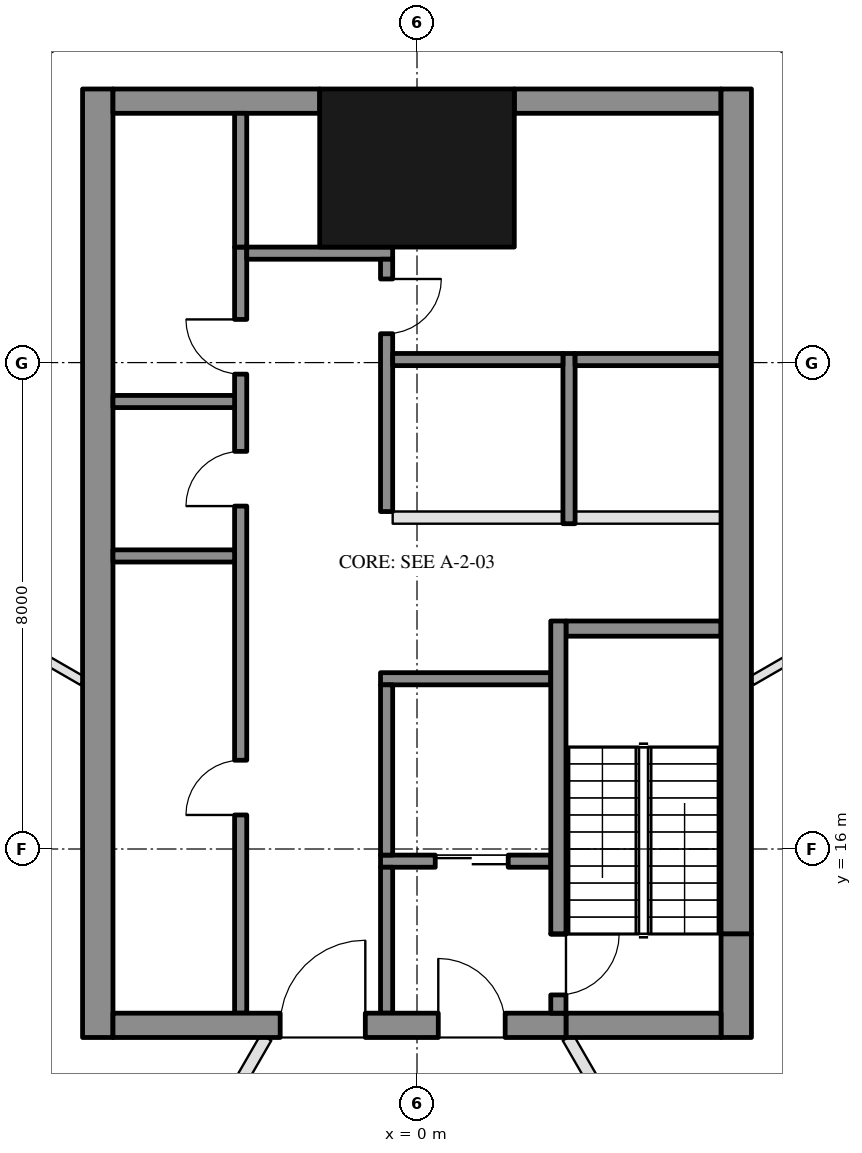
"""IFC4 building model, lengths in metres.
Left out: names, types, materials, properties, quantities, classifications, styles, units other than length and angle.
Written with IfcOpenShell. Run it as: python <this file> out.ifc"""

import sys

from ifc_helpers import new_model, si_unit, direction, frame, frame_2d, origin, origin_2d, place, context, subcontext, project, spatial, rectangle, hollow_rectangle, extrude, element, fill, save


model = new_model("IFC4")
c1 = context("Model", 3, precision=1e-05, world=origin(), true_north=direction((0.0, 1.0)))
c2 = subcontext(c1, "Body", "Model", "MODEL_VIEW")
j1 = project(units=[si_unit("LENGTHUNIT", "METRE"), si_unit("PLANEANGLEUNIT", "RADIAN")], contexts=[c1])
p1 = place(None, origin())
s1 = spatial("IfcSite", under=j1, at=p1, CompositionType="ELEMENT")
p2 = place(p1, origin())
s2 = spatial("IfcBuilding", under=s1, at=p2, CompositionType="ELEMENT")
p3 = place(p2, frame((0.0, 0.0, 15.5)))
s3 = spatial("IfcBuildingStorey", under=s2, at=p3, CompositionType="ELEMENT", Elevation=15.5)
p4 = place(p3, frame((0.0, 27.2, 0.0), z_axis=(0.0, 0.0, 1.0), x_axis=(1.0, 0.0, 0.0)))
e1 = element("IfcColumn", 1, at=p4, inside=s3, PredefinedType="COLUMN", context=c2, shape_type="SweptSolid", body=[
    extrude(hollow_rectangle(XDim=3.2, YDim=2.6, WallThickness=0.08, at=origin_2d()), origin(), (0.0, 0.0, 1.0), 8.0),
])
for number, where, z_axis, x_axis in (
    (2, (6.634, 28.969, 0.0), (0.0, 0.0, 1.0), (-0.866, 0.5, 0.0)),
    (3, (-4.887, 29.977, 0.0), (0.0, 0.0, 1.0), (-0.866, -0.5, 0.0)),
):
    element("IfcWall", number, at=place(p3, frame(where, z_axis=z_axis, x_axis=x_axis)), inside=s3, PredefinedType="SOLIDWALL", context=c2, shape_type="SweptSolid", body=[
        extrude(rectangle(XDim=2.017, YDim=0.35, at=frame_2d((1.009, 0.0))), origin(), (0.0, 0.0, 1.0), 7.7),
    ])
p5 = place(p3, frame((-5.25, 12.9, 0.0), z_axis=(0.0, 0.0, 1.0), x_axis=(0.0, 1.0, 0.0)))
e4 = element("IfcWall", 4, at=p5, inside=s3, PredefinedType="SHEAR", context=c2, shape_type="SweptSolid", body=[
    extrude(rectangle(XDim=15.6, YDim=0.5, at=frame_2d((7.8, 0.0))), origin(), (0.0, 0.0, 1.0), 7.7),
])
for number, where, z_axis, x_axis in (
    (5, (-1.6, 28.3, 0.0), (0.0, 0.0, 1.0), (-1.0, 0.0, 0.0)),
    (6, (5.0, 28.3, 0.0), (0.0, 0.0, 1.0), (-1.0, 0.0, 0.0)),
):
    element("IfcWall", number, at=place(p3, frame(where, z_axis=z_axis, x_axis=x_axis)), inside=s3, PredefinedType="SHEAR", context=c2, shape_type="SweptSolid", body=[
        extrude(rectangle(XDim=3.4, YDim=0.4, at=frame_2d((1.7, 0.0))), origin(), (0.0, 0.0, 1.0), 7.7),
    ])
p6 = place(p3, frame((5.0, 19.625, 0.0), z_axis=(0.0, 0.0, 1.0), x_axis=(-1.0, 0.0, 0.0)))
e7 = element("IfcWall", 7, at=p6, inside=s3, PredefinedType="SHEAR", context=c2, shape_type="SweptSolid", body=[
    extrude(rectangle(XDim=2.55, YDim=0.25, at=frame_2d((1.275, 0.0))), origin(), (0.0, 0.0, 1.0), 7.7),
])
p7 = place(p3, frame((2.2, 18.8, 0.0), z_axis=(0.0, 0.0, 1.0), x_axis=(-1.0, 0.0, 0.0)))
e8 = element("IfcWall", 8, at=p7, inside=s3, PredefinedType="SHEAR", context=c2, shape_type="SweptSolid", body=[
    extrude(rectangle(XDim=2.8, YDim=0.2, at=frame_2d((1.4, 0.0))), origin(), (0.0, 0.0, 1.0), 7.7),
])
p8 = place(p3, frame((2.2, 15.8, 0.0), z_axis=(0.0, 0.0, 1.0), x_axis=(-1.0, 0.0, 0.0)))
e9 = element("IfcWall", 9, at=p8, inside=s3, PredefinedType="SHEAR", context=c2, shape_type="SweptSolid", body=[
    extrude(rectangle(XDim=2.8, YDim=0.2, at=frame_2d((1.4, 0.0))), origin(), (0.0, 0.0, 1.0), 7.7),
])
p9 = place(p8, frame((0.7, 0.0, 0.0)))
e10 = element("IfcOpeningElement", 10, at=p9, cuts=e9, PredefinedType="OPENING", context=c2, shape_type="SweptSolid", body=[
    extrude(rectangle(XDim=1.2, YDim=2.1, at=frame_2d((0.6, 1.05))), frame((0.0, 0.11, 0.0), z_axis=(0.0, -1.0, 0.0), x_axis=(1.0, 0.0, 0.0)), (0.0, 0.0, 1.0), 0.22),
])
p10 = place(p3, frame((-0.5, 15.9, 0.0), z_axis=(0.0, 0.0, 1.0), x_axis=(0.0, 1.0, 0.0)))
e11 = element("IfcWall", 11, at=p10, inside=s3, PredefinedType="SHEAR", context=c2, shape_type="SweptSolid", body=[
    extrude(rectangle(XDim=2.8, YDim=0.2, at=frame_2d((1.4, 0.0))), origin(), (0.0, 0.0, 1.0), 7.7),
])
p11 = place(p3, frame((-0.5, 13.3, 0.0), z_axis=(0.0, 0.0, 1.0), x_axis=(0.0, 1.0, 0.0)))
e12 = element("IfcWall", 12, at=p11, inside=s3, PredefinedType="SHEAR", context=c2, shape_type="SweptSolid", body=[
    extrude(rectangle(XDim=2.4, YDim=0.2, at=frame_2d((1.2, 0.0))), origin(), (0.0, 0.0, 1.0), 7.7),
])
p12 = place(p3, frame((-2.9, 13.3, 0.0), z_axis=(0.0, 0.0, 1.0), x_axis=(0.0, 1.0, 0.0)))
e13 = element("IfcWall", 13, at=p12, inside=s3, PredefinedType="SHEAR", context=c2, shape_type="SweptSolid", body=[
    extrude(rectangle(XDim=12.6, YDim=0.2, at=frame_2d((6.3, 0.0))), origin(), (0.0, 0.0, 1.0), 7.7),
])
p13 = place(p12, frame((3.26, 0.0, 0.0)))
e14 = element("IfcOpeningElement", 14, at=p13, cuts=e13, PredefinedType="OPENING", context=c2, shape_type="SweptSolid", body=[
    extrude(rectangle(XDim=0.9, YDim=2.1, at=frame_2d((0.45, 1.05))), frame((0.0, 0.11, 0.0), z_axis=(0.0, -1.0, 0.0), x_axis=(1.0, 0.0, 0.0)), (0.0, 0.0, 1.0), 0.22),
])
p14 = place(p12, frame((8.34, 0.0, 0.0)))
e15 = element("IfcOpeningElement", 15, at=p14, cuts=e13, PredefinedType="OPENING", context=c2, shape_type="SweptSolid", body=[
    extrude(rectangle(XDim=0.9, YDim=2.1, at=frame_2d((0.45, 1.05))), frame((0.0, 0.11, 0.0), z_axis=(0.0, -1.0, 0.0), x_axis=(1.0, 0.0, 0.0)), (0.0, 0.0, 1.0), 0.22),
])
p15 = place(p12, frame((10.51, 0.0, 0.0)))
e16 = element("IfcOpeningElement", 16, at=p15, cuts=e13, PredefinedType="OPENING", context=c2, shape_type="SweptSolid", body=[
    extrude(rectangle(XDim=0.9, YDim=2.1, at=frame_2d((0.45, 1.05))), frame((0.0, 0.11, 0.0), z_axis=(0.0, -1.0, 0.0), x_axis=(1.0, 0.0, 0.0)), (0.0, 0.0, 1.0), 0.22),
])
p16 = place(p3, frame((-0.4, 25.8, 0.0), z_axis=(0.0, 0.0, 1.0), x_axis=(-1.0, 0.0, 0.0)))
e17 = element("IfcWall", 17, at=p16, inside=s3, PredefinedType="SHEAR", context=c2, shape_type="SweptSolid", body=[
    extrude(rectangle(XDim=2.4, YDim=0.2, at=frame_2d((1.2, 0.0))), origin(), (0.0, 0.0, 1.0), 7.7),
])
p17 = place(p3, frame((-0.5, 21.55, 0.0), z_axis=(0.0, 0.0, 1.0), x_axis=(0.0, 1.0, 0.0)))
e18 = element("IfcWall", 18, at=p17, inside=s3, PredefinedType="SHEAR", context=c2, shape_type="SweptSolid", body=[
    extrude(rectangle(XDim=4.15, YDim=0.2, at=frame_2d((2.075, 0.0))), origin(), (0.0, 0.0, 1.0), 7.7),
])
p18 = place(p17, frame((2.925, 0.0, 0.0)))
e19 = element("IfcOpeningElement", 19, at=p18, cuts=e18, PredefinedType="OPENING", context=c2, shape_type="SweptSolid", body=[
    extrude(rectangle(XDim=0.9, YDim=2.1, at=frame_2d((0.45, 1.05))), frame((0.0, 0.11, 0.0), z_axis=(0.0, -1.0, 0.0), x_axis=(1.0, 0.0, 0.0)), (0.0, 0.0, 1.0), 0.22),
])
for number, where, z_axis, x_axis in (
    (20, (-3.0, 20.82, 0.0), (0.0, 0.0, 1.0), (-1.0, 0.0, 0.0)),
    (21, (-3.0, 23.36, 0.0), (0.0, 0.0, 1.0), (-1.0, 0.0, 0.0)),
):
    element("IfcWall", number, at=place(p3, frame(where, z_axis=z_axis, x_axis=x_axis)), inside=s3, PredefinedType="SHEAR", context=c2, shape_type="SweptSolid", body=[
        extrude(rectangle(XDim=2.0, YDim=0.2, at=frame_2d((1.0, 0.0))), origin(), (0.0, 0.0, 1.0), 7.7),
    ])
p19 = place(p3, frame((-2.9, 25.9, 0.0), z_axis=(0.0, 0.0, 1.0), x_axis=(0.0, 1.0, 0.0)))
e22 = element("IfcWall", 22, at=p19, inside=s3, PredefinedType="SHEAR", context=c2, shape_type="SweptSolid", body=[
    extrude(rectangle(XDim=2.2, YDim=0.2, at=frame_2d((1.1, 0.0))), origin(), (0.0, 0.0, 1.0), 7.7),
])
p20 = place(p3, frame((2.5, 21.35, 0.0), z_axis=(0.0, 0.0, 1.0), x_axis=(0.0, 1.0, 0.0)))
e23 = element("IfcWall", 23, at=p20, inside=s3, PredefinedType="SHEAR", context=c2, shape_type="SweptSolid", body=[
    extrude(rectangle(XDim=2.8, YDim=0.2, at=frame_2d((1.4, 0.0))), origin(), (0.0, 0.0, 1.0), 7.7),
])
p21 = place(p3, frame((5.0, 24.05, 0.0), z_axis=(0.0, 0.0, 1.0), x_axis=(-1.0, 0.0, 0.0)))
e24 = element("IfcWall", 24, at=p21, inside=s3, PredefinedType="SHEAR", context=c2, shape_type="SweptSolid", body=[
    extrude(rectangle(XDim=2.4, YDim=0.2, at=frame_2d((1.2, 0.0))), origin(), (0.0, 0.0, 1.0), 7.7),
])
p22 = place(p3, frame((2.4, 24.05, 0.0), z_axis=(0.0, 0.0, 1.0), x_axis=(-1.0, 0.0, 0.0)))
e25 = element("IfcWall", 25, at=p22, inside=s3, PredefinedType="SHEAR", context=c2, shape_type="SweptSolid", body=[
    extrude(rectangle(XDim=2.8, YDim=0.2, at=frame_2d((1.4, 0.0))), origin(), (0.0, 0.0, 1.0), 7.7),
])
p23 = place(p3, frame((5.0, 21.45, 0.0), z_axis=(0.0, 0.0, 1.0), x_axis=(-1.0, 0.0, 0.0)))
e26 = element("IfcWall", 26, at=p23, inside=s3, PredefinedType="PARTITIONING", context=c2, shape_type="SweptSolid", body=[
    extrude(rectangle(XDim=2.4, YDim=0.2, at=frame_2d((1.2, 0.0))), origin(), (0.0, 0.0, 1.0), 7.7),
])
p24 = place(p3, frame((2.4, 21.45, 0.0), z_axis=(0.0, 0.0, 1.0), x_axis=(-1.0, 0.0, 0.0)))
e27 = element("IfcWall", 27, at=p24, inside=s3, PredefinedType="PARTITIONING", context=c2, shape_type="SweptSolid", body=[
    extrude(rectangle(XDim=2.8, YDim=0.2, at=frame_2d((1.4, 0.0))), origin(), (0.0, 0.0, 1.0), 7.7),
])
p25 = place(p3, frame((5.25, 12.9, 0.0), z_axis=(0.0, 0.0, 1.0), x_axis=(0.0, 1.0, 0.0)))
e28 = element("IfcWall", 28, at=p25, inside=s3, PredefinedType="SHEAR", context=c2, shape_type="SweptSolid", body=[
    extrude(rectangle(XDim=1.706, YDim=0.5, at=frame_2d((0.853, 0.0))), origin(), (0.0, 0.0, 1.0), 7.7),
])
p26 = place(p3, frame((5.25, 14.606, 0.0), z_axis=(0.0, 0.0, 1.0), x_axis=(0.0, 1.0, 0.0)))
e29 = element("IfcWall", 29, at=p26, inside=s3, PredefinedType="SHEAR", context=c2, shape_type="SweptSolid", body=[
    extrude(rectangle(XDim=13.894, YDim=0.5, at=frame_2d((6.947, 0.0))), origin(), (0.0, 0.0, 1.0), 7.7),
])
p27 = place(p3, frame((5.0, 13.1, 0.0), z_axis=(0.0, 0.0, 1.0), x_axis=(-1.0, 0.0, 0.0)))
e30 = element("IfcWall", 30, at=p27, inside=s3, PredefinedType="SHEAR", context=c2, shape_type="SweptSolid", body=[
    extrude(rectangle(XDim=2.55, YDim=0.4, at=frame_2d((1.275, 0.0))), origin(), (0.0, 0.0, 1.0), 7.7),
])
p28 = place(p3, frame((2.45, 13.1, 0.0), z_axis=(0.0, 0.0, 1.0), x_axis=(-1.0, 0.0, 0.0)))
e31 = element("IfcWall", 31, at=p28, inside=s3, PredefinedType="SHEAR", context=c2, shape_type="SweptSolid", body=[
    extrude(rectangle(XDim=7.45, YDim=0.4, at=frame_2d((3.725, 0.0))), origin(), (0.0, 0.0, 1.0), 7.7),
])
p29 = place(p28, frame((1.0, 0.0, 0.0)))
e32 = element("IfcOpeningElement", 32, at=p29, cuts=e31, PredefinedType="OPENING", context=c2, shape_type="SweptSolid", body=[
    extrude(rectangle(XDim=1.1, YDim=2.1, at=frame_2d((0.55, 1.05))), frame((0.0, 0.21, 0.0), z_axis=(0.0, -1.0, 0.0), x_axis=(1.0, 0.0, 0.0)), (0.0, 0.0, 1.0), 0.42),
])
p30 = place(p28, frame((3.3, 0.0, 0.0)))
e33 = element("IfcOpeningElement", 33, at=p30, cuts=e31, PredefinedType="OPENING", context=c2, shape_type="SweptSolid", body=[
    extrude(rectangle(XDim=1.4, YDim=2.1, at=frame_2d((0.7, 1.05))), frame((0.0, 0.21, 0.0), z_axis=(0.0, -1.0, 0.0), x_axis=(1.0, 0.0, 0.0)), (0.0, 0.0, 1.0), 0.42),
])
p31 = place(p3, frame((2.325, 13.3, 0.0), z_axis=(0.0, 0.0, 1.0), x_axis=(0.0, 1.0, 0.0)))
e34 = element("IfcWall", 34, at=p31, inside=s3, PredefinedType="SHEAR", context=c2, shape_type="SweptSolid", body=[
    extrude(rectangle(XDim=1.306, YDim=0.25, at=frame_2d((0.653, 0.0))), origin(), (0.0, 0.0, 1.0), 7.7),
])
p32 = place(p31, frame((0.3, 0.0, 0.0)))
e35 = element("IfcOpeningElement", 35, at=p32, cuts=e34, PredefinedType="OPENING", context=c2, shape_type="SweptSolid", body=[
    extrude(rectangle(XDim=1.0, YDim=2.1, at=frame_2d((0.5, 1.05))), frame((0.0, 0.135, 0.0), z_axis=(0.0, -1.0, 0.0), x_axis=(1.0, 0.0, 0.0)), (0.0, 0.0, 1.0), 0.27),
])
p33 = place(p3, frame((2.325, 14.606, 0.0), z_axis=(0.0, 0.0, 1.0), x_axis=(0.0, 1.0, 0.0)))
e36 = element("IfcWall", 36, at=p33, inside=s3, PredefinedType="SHEAR", context=c2, shape_type="SweptSolid", body=[
    extrude(rectangle(XDim=5.144, YDim=0.25, at=frame_2d((2.572, 0.0))), origin(), (0.0, 0.0, 1.0), 7.7),
])
p34 = place(p3, frame((14.581, 15.808, 0.0), z_axis=(0.0, 0.0, 1.0), x_axis=(-0.866032672044, -0.499987410794, 0.0)))
e37 = element("IfcWall", 37, at=p34, inside=s3, PredefinedType="SOLIDWALL", context=c2, shape_type="SweptSolid", body=[
    extrude(rectangle(XDim=11.831, YDim=0.2, at=frame_2d((5.916, 0.0))), origin(), (0.0, 0.0, 1.0), 7.7),
])
p35 = place(p3, frame((11.031, 21.957, 0.0), z_axis=(0.0, 0.0, 1.0), x_axis=(-0.866030253878, -0.499991599297, 0.0)))
e38 = element("IfcWall", 38, at=p35, inside=s3, PredefinedType="PARTITIONING", context=c2, shape_type="SweptSolid", body=[
    extrude(rectangle(XDim=6.386, YDim=0.15, at=frame_2d((3.193, 0.0))), origin(), (0.0, 0.0, 1.0), 7.1),
])
p36 = place(p35, frame((2.743, 0.0, 0.0)))
e39 = element("IfcOpeningElement", 39, at=p36, cuts=e38, PredefinedType="OPENING", context=c2, shape_type="SweptSolid", body=[
    extrude(rectangle(XDim=0.9, YDim=2.1, at=frame_2d((0.45, 1.05))), frame((0.0, 0.085, 0.0), z_axis=(0.0, -1.0, 0.0), x_axis=(1.0, 0.0, 0.0)), (0.0, 0.0, 1.0), 0.17),
])
p37 = place(p3, frame((12.413, -4.3, 0.0), z_axis=(0.0, 0.0, 1.0), x_axis=(-0.50000478328, 0.866022642139, 0.0)))
e40 = element("IfcWall", 40, at=p37, inside=s3, PredefinedType="PARTITIONING", context=c2, shape_type="SweptSolid", body=[
    extrude(rectangle(XDim=19.861, YDim=0.2, at=frame_2d((9.931, 0.0))), origin(), (0.0, 0.0, 1.0), 6.91),
])
p38 = place(p37, frame((1.634, 0.0, 0.0)))
e41 = element("IfcOpeningElement", 41, at=p38, cuts=e40, PredefinedType="OPENING", context=c2, shape_type="SweptSolid", body=[
    extrude(rectangle(XDim=1.2, YDim=2.1, at=frame_2d((0.6, 1.05))), frame((0.0, 0.11, 0.0), z_axis=(0.0, -1.0, 0.0), x_axis=(1.0, 0.0, 0.0)), (0.0, 0.0, 1.0), 0.22),
])
p39 = place(p37, frame((5.381, 0.0, 0.0)))
e42 = element("IfcOpeningElement", 42, at=p39, cuts=e40, PredefinedType="OPENING", context=c2, shape_type="SweptSolid", body=[
    extrude(rectangle(XDim=1.8, YDim=2.4, at=frame_2d((0.9, 1.2))), frame((0.0, 0.11, 0.0), z_axis=(0.0, -1.0, 0.0), x_axis=(1.0, 0.0, 0.0)), (0.0, 0.0, 1.0), 0.22),
])
p40 = place(p37, frame((9.155, 0.0, 0.0)))
e43 = element("IfcOpeningElement", 43, at=p40, cuts=e40, PredefinedType="OPENING", context=c2, shape_type="SweptSolid", body=[
    extrude(rectangle(XDim=1.8, YDim=2.4, at=frame_2d((0.9, 1.2))), frame((0.0, 0.11, 0.0), z_axis=(0.0, -1.0, 0.0), x_axis=(1.0, 0.0, 0.0)), (0.0, 0.0, 1.0), 0.22),
])
p41 = place(p37, frame((16.89, 0.0, 0.0)))
e44 = element("IfcOpeningElement", 44, at=p41, cuts=e40, PredefinedType="OPENING", context=c2, shape_type="SweptSolid", body=[
    extrude(rectangle(XDim=1.8, YDim=2.4, at=frame_2d((0.9, 1.2))), frame((0.0, 0.11, 0.0), z_axis=(0.0, -1.0, 0.0), x_axis=(1.0, 0.0, 0.0)), (0.0, 0.0, 1.0), 0.22),
])
p42 = place(p37, frame((13.23, 0.0, 0.0)))
e45 = element("IfcOpeningElement", 45, at=p42, cuts=e40, PredefinedType="OPENING", context=c2, shape_type="SweptSolid", body=[
    extrude(rectangle(XDim=1.8, YDim=2.1, at=frame_2d((0.9, 1.05))), frame((0.0, 0.11, 0.0), z_axis=(0.0, -1.0, 0.0), x_axis=(1.0, 0.0, 0.0)), (0.0, 0.0, 1.0), 0.22),
])
p43 = place(p3, frame((-11.031, 21.957, 0.0), z_axis=(0.0, 0.0, 1.0), x_axis=(0.866030253878, -0.499991599297, 0.0)))
e46 = element("IfcWall", 46, at=p43, inside=s3, PredefinedType="PARTITIONING", context=c2, shape_type="SweptSolid", body=[
    extrude(rectangle(XDim=6.386, YDim=0.15, at=frame_2d((3.193, 0.0))), origin(), (0.0, 0.0, 1.0), 7.1),
])
p44 = place(p43, frame((2.743, 0.0, 0.0)))
e47 = element("IfcOpeningElement", 47, at=p44, cuts=e46, PredefinedType="OPENING", context=c2, shape_type="SweptSolid", body=[
    extrude(rectangle(XDim=0.9, YDim=2.1, at=frame_2d((0.45, 1.05))), frame((0.0, 0.085, 0.0), z_axis=(0.0, -1.0, 0.0), x_axis=(1.0, 0.0, 0.0)), (0.0, 0.0, 1.0), 0.17),
])
p45 = place(p3, frame((-14.531, 15.895, 0.0), z_axis=(0.0, 0.0, 1.0), x_axis=(0.866032672044, -0.499987410794, 0.0)))
e48 = element("IfcWall", 48, at=p45, inside=s3, PredefinedType="PARTITIONING", context=c2, shape_type="SweptSolid", body=[
    extrude(rectangle(XDim=11.831, YDim=0.15, at=frame_2d((5.916, 0.0))), origin(), (0.0, 0.0, 1.0), 7.1),
])
p46 = place(p3, frame((-2.482, 12.9, 0.0), z_axis=(0.0, 0.0, 1.0), x_axis=(-0.50000478328, -0.866022642139, 0.0)))
e49 = element("IfcWall", 49, at=p46, inside=s3, PredefinedType="PARTITIONING", context=c2, shape_type="SweptSolid", body=[
    extrude(rectangle(XDim=19.861, YDim=0.2, at=frame_2d((9.931, 0.0))), origin(), (0.0, 0.0, 1.0), 6.91),
])
p47 = place(p46, frame((13.23, 0.0, 0.0)))
e50 = element("IfcOpeningElement", 50, at=p47, cuts=e49, PredefinedType="OPENING", context=c2, shape_type="SweptSolid", body=[
    extrude(rectangle(XDim=1.8, YDim=2.1, at=frame_2d((0.9, 1.05))), frame((0.0, 0.11, 0.0), z_axis=(0.0, -1.0, 0.0), x_axis=(1.0, 0.0, 0.0)), (0.0, 0.0, 1.0), 0.22),
])
p48 = place(p46, frame((1.134, 0.0, 0.0)))
e51 = element("IfcOpeningElement", 51, at=p48, cuts=e49, PredefinedType="OPENING", context=c2, shape_type="SweptSolid", body=[
    extrude(rectangle(XDim=1.8, YDim=2.4, at=frame_2d((0.9, 1.2))), frame((0.0, 0.11, 0.0), z_axis=(0.0, -1.0, 0.0), x_axis=(1.0, 0.0, 0.0)), (0.0, 0.0, 1.0), 0.22),
])
p49 = place(p46, frame((17.59, 0.0, 0.0)))
e52 = element("IfcOpeningElement", 52, at=p49, cuts=e49, PredefinedType="OPENING", context=c2, shape_type="SweptSolid", body=[
    extrude(rectangle(XDim=1.0, YDim=2.1, at=frame_2d((0.5, 1.05))), frame((0.0, 0.11, 0.0), z_axis=(0.0, -1.0, 0.0), x_axis=(1.0, 0.0, 0.0)), (0.0, 0.0, 1.0), 0.22),
])
p50 = place(p46, frame((7.168, 0.0, 0.0)))
e53 = element("IfcOpeningElement", 53, at=p50, cuts=e49, PredefinedType="OPENING", context=c2, shape_type="SweptSolid", body=[
    extrude(rectangle(XDim=1.0, YDim=2.1, at=frame_2d((0.5, 1.05))), frame((0.0, 0.11, 0.0), z_axis=(0.0, -1.0, 0.0), x_axis=(1.0, 0.0, 0.0)), (0.0, 0.0, 1.0), 0.22),
])
p51 = place(p9, origin())
e54 = element("IfcDoor", 54, at=p51, inside=s3, OperationType="DOUBLE_DOOR_SLIDING", PredefinedType="DOOR", context=c2, shape_type="SweptSolid", body=[
    extrude(rectangle(XDim=1.2, YDim=2.1, at=frame_2d((0.6, 1.05))), frame((0.0, 0.025, 0.0), z_axis=(0.0, -1.0, 0.0), x_axis=(1.0, 0.0, 0.0)), (0.0, 0.0, 1.0), 0.05),
])
fill(e10, e54)
p52 = place(p13, origin())
e55 = element("IfcDoor", 55, at=p52, inside=s3, OperationType="SINGLE_SWING_LEFT", PredefinedType="DOOR", context=c2, shape_type="SweptSolid", body=[
    extrude(rectangle(XDim=0.9, YDim=2.1, at=frame_2d((0.45, 1.05))), frame((0.0, 0.025, 0.0), z_axis=(0.0, -1.0, 0.0), x_axis=(1.0, 0.0, 0.0)), (0.0, 0.0, 1.0), 0.05),
])
fill(e14, e55)
p53 = place(p14, origin())
e56 = element("IfcDoor", 56, at=p53, inside=s3, OperationType="SINGLE_SWING_LEFT", PredefinedType="DOOR", context=c2, shape_type="SweptSolid", body=[
    extrude(rectangle(XDim=0.9, YDim=2.1, at=frame_2d((0.45, 1.05))), frame((0.0, 0.025, 0.0), z_axis=(0.0, -1.0, 0.0), x_axis=(1.0, 0.0, 0.0)), (0.0, 0.0, 1.0), 0.05),
])
fill(e15, e56)
p54 = place(p15, origin())
e57 = element("IfcDoor", 57, at=p54, inside=s3, OperationType="SINGLE_SWING_RIGHT", PredefinedType="DOOR", context=c2, shape_type="SweptSolid", body=[
    extrude(rectangle(XDim=0.9, YDim=2.1, at=frame_2d((0.45, 1.05))), frame((0.0, 0.025, 0.0), z_axis=(0.0, -1.0, 0.0), x_axis=(1.0, 0.0, 0.0)), (0.0, 0.0, 1.0), 0.05),
])
fill(e16, e57)
p55 = place(p18, frame((0.9, 0.0, 0.0), z_axis=(0.0, 0.0, 1.0), x_axis=(-1.0, 0.0, 0.0)))
e58 = element("IfcDoor", 58, at=p55, inside=s3, OperationType="SINGLE_SWING_LEFT", PredefinedType="DOOR", context=c2, shape_type="SweptSolid", body=[
    extrude(rectangle(XDim=0.9, YDim=2.1, at=frame_2d((0.45, 1.05))), frame((0.0, 0.025, 0.0), z_axis=(0.0, -1.0, 0.0), x_axis=(1.0, 0.0, 0.0)), (0.0, 0.0, 1.0), 0.05),
])
fill(e19, e58)
p56 = place(p29, frame((1.1, 0.0, 0.0), z_axis=(0.0, 0.0, 1.0), x_axis=(-1.0, 0.0, 0.0)))
e59 = element("IfcDoor", 59, at=p56, inside=s3, OperationType="SINGLE_SWING_LEFT", PredefinedType="DOOR", context=c2, shape_type="SweptSolid", body=[
    extrude(rectangle(XDim=1.1, YDim=2.1, at=frame_2d((0.55, 1.05))), frame((0.0, 0.025, 0.0), z_axis=(0.0, -1.0, 0.0), x_axis=(1.0, 0.0, 0.0)), (0.0, 0.0, 1.0), 0.05),
])
fill(e32, e59)
p57 = place(p30, frame((1.4, 0.0, 0.0), z_axis=(0.0, 0.0, 1.0), x_axis=(-1.0, 0.0, 0.0)))
e60 = element("IfcDoor", 60, at=p57, inside=s3, OperationType="DOUBLE_DOOR_SINGLE_SWING", PredefinedType="DOOR", context=c2, shape_type="SweptSolid", body=[
    extrude(rectangle(XDim=1.4, YDim=2.1, at=frame_2d((0.7, 1.05))), frame((0.0, 0.025, 0.0), z_axis=(0.0, -1.0, 0.0), x_axis=(1.0, 0.0, 0.0)), (0.0, 0.0, 1.0), 0.05),
])
fill(e33, e60)
p58 = place(p32, frame((1.0, 0.0, 0.0), z_axis=(0.0, 0.0, 1.0), x_axis=(-1.0, 0.0, 0.0)))
e61 = element("IfcDoor", 61, at=p58, inside=s3, OperationType="SINGLE_SWING_LEFT", PredefinedType="DOOR", context=c2, shape_type="SweptSolid", body=[
    extrude(rectangle(XDim=1.0, YDim=2.1, at=frame_2d((0.5, 1.05))), frame((0.0, 0.025, 0.0), z_axis=(0.0, -1.0, 0.0), x_axis=(1.0, 0.0, 0.0)), (0.0, 0.0, 1.0), 0.05),
])
fill(e35, e61)
save(model, sys.argv[1])
